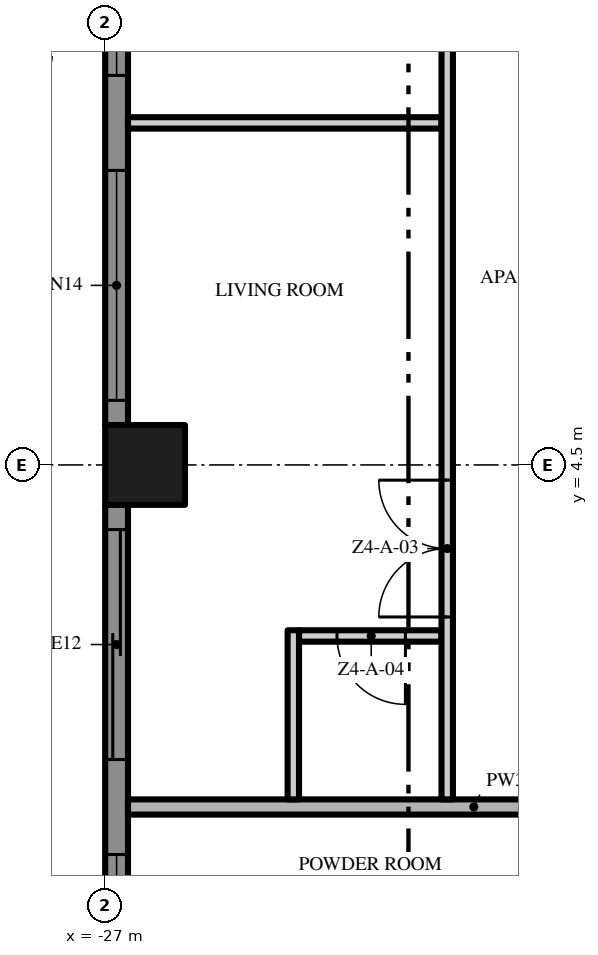
"""IFC4 building model, lengths in metres.
Left out: names, types, materials, properties, quantities, classifications, styles, units other than length and angle.
Written with IfcOpenShell. Run it as: python <this file> out.ifc"""

import sys

from ifc_helpers import new_model, si_unit, direction, frame, frame_2d, origin, origin_2d, place, context, subcontext, project, spatial, polyline, rectangle, outline, extrude, element, fill, save


model = new_model("IFC4")
c1 = context("Model", 3, precision=1e-05, world=origin(), true_north=direction((0.0, 1.0)))
c2 = subcontext(c1, "Body", "Model", "MODEL_VIEW")
j1 = project(units=[si_unit("LENGTHUNIT", "METRE"), si_unit("PLANEANGLEUNIT", "RADIAN")], contexts=[c1])
p1 = place(None, origin())
s1 = spatial("IfcSite", under=j1, at=p1, CompositionType="ELEMENT")
p2 = place(p1, origin())
s2 = spatial("IfcBuilding", under=s1, at=p2, CompositionType="ELEMENT")
p3 = place(p2, frame((0.0, 0.0, 188.2)))
s3 = spatial("IfcBuildingStorey", under=s2, at=p3, CompositionType="ELEMENT", Elevation=188.2)
p4 = place(p3, frame((-26.475, 4.5, 0.0), z_axis=(0.0, 0.0, 1.0), x_axis=(1.0, 0.0, 0.0)))
e1 = element("IfcColumn", 1, at=p4, inside=s3, PredefinedType="COLUMN", context=c2, shape_type="SweptSolid", body=[
    extrude(rectangle(XDim=1.05, YDim=1.05, at=origin_2d()), origin(), (0.0, 0.0, 1.0), 3.5),
])
p5 = place(p3, frame((-26.85, 5.025, 0.0), z_axis=(0.0, 0.0, 1.0), x_axis=(0.0, 1.0, 0.0)))
e2 = element("IfcWall", 2, at=p5, inside=s3, PredefinedType="SOLIDWALL", context=c2, shape_type="SweptSolid", body=[
    extrude(rectangle(XDim=7.95, YDim=0.3, at=frame_2d((3.975, 0.0))), origin(), (0.0, 0.0, 1.0), 3.5),
])
p6 = place(p5, frame((4.6, 0.0, 0.45)))
e3 = element("IfcOpeningElement", 3, at=p6, cuts=e2, PredefinedType="OPENING", context=c2, shape_type="SweptSolid", body=[
    extrude(rectangle(XDim=3.025, YDim=2.65, at=frame_2d((1.512, 1.325))), frame((0.0, 0.16, 0.0), z_axis=(0.0, -1.0, 0.0), x_axis=(1.0, 0.0, 0.0)), (0.0, 0.0, 1.0), 0.32),
])
p7 = place(p5, frame((0.325, 0.0, 0.45)))
e4 = element("IfcOpeningElement", 4, at=p7, cuts=e2, PredefinedType="OPENING", context=c2, shape_type="SweptSolid", body=[
    extrude(rectangle(XDim=3.025, YDim=2.65, at=frame_2d((1.512, 1.325))), frame((0.0, 0.16, 0.0), z_axis=(0.0, -1.0, 0.0), x_axis=(1.0, 0.0, 0.0)), (0.0, 0.0, 1.0), 0.32),
])
p8 = place(p3, frame((-26.85, -3.975, 0.0), z_axis=(0.0, 0.0, 1.0), x_axis=(0.0, 1.0, 0.0)))
e5 = element("IfcWall", 5, at=p8, inside=s3, PredefinedType="SOLIDWALL", context=c2, shape_type="SweptSolid", body=[
    extrude(rectangle(XDim=7.95, YDim=0.3, at=frame_2d((3.975, 0.0))), origin(), (0.0, 0.0, 1.0), 3.5),
])
p9 = place(p8, frame((4.6, 0.0, 0.0)))
e6 = element("IfcOpeningElement", 6, at=p9, cuts=e5, PredefinedType="OPENING", context=c2, shape_type="SweptSolid", body=[
    extrude(rectangle(XDim=3.025, YDim=2.4, at=frame_2d((1.512, 1.2))), frame((0.0, 0.16, 0.0), z_axis=(0.0, -1.0, 0.0), x_axis=(1.0, 0.0, 0.0)), (0.0, 0.0, 1.0), 0.32),
])
p10 = place(p8, frame((0.325, 0.0, 0.45)))
e7 = element("IfcOpeningElement", 7, at=p10, cuts=e5, PredefinedType="OPENING", context=c2, shape_type="SweptSolid", body=[
    extrude(rectangle(XDim=3.025, YDim=2.65, at=frame_2d((1.512, 1.325))), frame((0.0, 0.16, 0.0), z_axis=(0.0, -1.0, 0.0), x_axis=(1.0, 0.0, 0.0)), (0.0, 0.0, 1.0), 0.32),
])
p11 = place(p3, origin())
e8 = element("IfcWall", 8, at=p11, inside=s3, PredefinedType="USERDEFINED", context=c2, shape_type="SweptSolid", body=[
    extrude(outline(polyline([(-30.0, 18.0), (-29.771, 16.5), (-29.171, 15.0), (-28.429, 13.5), (-27.829, 12.0), (-27.6, 10.5), (-27.829, 9.0), (-28.429, 7.5), (-29.171, 6.0), (-29.771, 4.5), (-30.0, 3.0), (-29.771, 1.5), (-29.171, 0.0), (-28.429, -1.5), (-27.829, -3.0), (-27.6, -4.5), (-27.829, -6.0), (-28.429, -7.5), (-29.171, -9.0), (-29.771, -10.5), (-30.0, -12.0), (-29.771, -13.5), (-29.171, -15.0), (-28.429, -16.5), (-27.829, -18.0), (-27.597, -17.907), (-28.201, -16.398), (-28.942, -14.898), (-29.528, -13.434), (-29.747, -12.0), (-29.528, -10.566), (-28.942, -9.102), (-28.201, -7.602), (-27.586, -6.066), (-27.347, -4.5), (-27.586, -2.934), (-28.201, -1.398), (-28.942, 0.102), (-29.528, 1.566), (-29.747, 3.0), (-29.528, 4.434), (-28.942, 5.898), (-28.201, 7.398), (-27.586, 8.934), (-27.347, 10.5), (-27.586, 12.066), (-28.201, 13.602), (-28.942, 15.102), (-29.528, 16.566), (-29.753, 18.038), (-30.0, 18.0)])), origin(), (0.0, 0.0, 1.0), 0.9),
])
p12 = place(p3, frame((-26.7, 0.0, 0.0), z_axis=(0.0, 0.0, 1.0), x_axis=(1.0, 0.0, 0.0)))
e9 = element("IfcWall", 9, at=p12, inside=s3, PredefinedType="PARTITIONING", context=c2, shape_type="SweptSolid", body=[
    extrude(rectangle(XDim=9.1, YDim=0.2, at=frame_2d((4.55, 0.0))), origin(), (0.0, 0.0, 1.0), 3.5),
])
p13 = place(p3, frame((-22.575, 2.25, 0.0), z_axis=(0.0, 0.0, 1.0), x_axis=(-1.0, 0.0, 0.0)))
e10 = element("IfcWall", 10, at=p13, inside=s3, PredefinedType="PARTITIONING", context=c2, shape_type="SweptSolid", body=[
    extrude(rectangle(XDim=1.875, YDim=0.15, at=frame_2d((0.938, 0.0))), origin(), (0.0, 0.0, 1.0), 3.5),
])
p14 = place(p13, frame((0.475, 0.0, 0.0)))
e11 = element("IfcOpeningElement", 11, at=p14, cuts=e10, PredefinedType="OPENING", context=c2, shape_type="SweptSolid", body=[
    extrude(rectangle(XDim=0.9, YDim=2.1, at=frame_2d((0.45, 1.05))), frame((0.0, 0.085, 0.0), z_axis=(0.0, -1.0, 0.0), x_axis=(1.0, 0.0, 0.0)), (0.0, 0.0, 1.0), 0.17),
])
p15 = place(p3, frame((-26.7, 9.0, 0.0), z_axis=(0.0, 0.0, 1.0), x_axis=(1.0, 0.0, 0.0)))
e12 = element("IfcWall", 12, at=p15, inside=s3, PredefinedType="PARTITIONING", context=c2, shape_type="SweptSolid", body=[
    extrude(rectangle(XDim=4.125, YDim=0.15, at=frame_2d((2.062, 0.0))), origin(), (0.0, 0.0, 1.0), 3.5),
])
p16 = place(p3, frame((-24.525, 0.1, 0.0), z_axis=(0.0, 0.0, 1.0), x_axis=(0.0, 1.0, 0.0)))
e13 = element("IfcWall", 13, at=p16, inside=s3, PredefinedType="PARTITIONING", context=c2, shape_type="SweptSolid", body=[
    extrude(rectangle(XDim=2.225, YDim=0.15, at=frame_2d((1.113, 0.0))), origin(), (0.0, 0.0, 1.0), 3.5),
])
p17 = place(p3, frame((-22.5, 0.1, 0.0), z_axis=(0.0, 0.0, 1.0), x_axis=(0.0, 1.0, 0.0)))
e14 = element("IfcWall", 14, at=p17, inside=s3, PredefinedType="PARTITIONING", context=c2, shape_type="SweptSolid", body=[
    extrude(rectangle(XDim=17.375, YDim=0.15, at=frame_2d((8.688, 0.0))), origin(), (0.0, 0.0, 1.0), 3.5),
])
p18 = place(p17, frame((2.4, 0.0, 0.0)))
e15 = element("IfcOpeningElement", 15, at=p18, cuts=e14, PredefinedType="OPENING", context=c2, shape_type="SweptSolid", body=[
    extrude(rectangle(XDim=1.8, YDim=2.4, at=frame_2d((0.9, 1.2))), frame((0.0, 0.085, 0.0), z_axis=(0.0, -1.0, 0.0), x_axis=(1.0, 0.0, 0.0)), (0.0, 0.0, 1.0), 0.17),
])
p19 = place(p17, frame((10.65, 0.0, 0.0)))
e16 = element("IfcOpeningElement", 16, at=p19, cuts=e14, PredefinedType="OPENING", context=c2, shape_type="SweptSolid", body=[
    extrude(rectangle(XDim=1.0, YDim=2.4, at=frame_2d((0.5, 1.2))), frame((0.0, 0.085, 0.0), z_axis=(0.0, -1.0, 0.0), x_axis=(1.0, 0.0, 0.0)), (0.0, 0.0, 1.0), 0.17),
])
p20 = place(p6, origin())
e17 = element("IfcWindow", 17, at=p20, inside=s3, PartitioningType="SINGLE_PANEL", PredefinedType="WINDOW", context=c2, shape_type="SweptSolid", body=[
    extrude(rectangle(XDim=3.025, YDim=2.65, at=frame_2d((1.512, 1.325))), frame((0.0, 0.03, 0.0), z_axis=(0.0, -1.0, 0.0), x_axis=(1.0, 0.0, 0.0)), (0.0, 0.0, 1.0), 0.06),
])
fill(e3, e17)
p21 = place(p7, origin())
e18 = element("IfcWindow", 18, at=p21, inside=s3, PartitioningType="SINGLE_PANEL", PredefinedType="WINDOW", context=c2, shape_type="SweptSolid", body=[
    extrude(rectangle(XDim=3.025, YDim=2.65, at=frame_2d((1.512, 1.325))), frame((0.0, 0.03, 0.0), z_axis=(0.0, -1.0, 0.0), x_axis=(1.0, 0.0, 0.0)), (0.0, 0.0, 1.0), 0.06),
])
fill(e4, e18)
p22 = place(p9, origin())
e19 = element("IfcDoor", 19, at=p22, inside=s3, OperationType="SINGLE_SWING_LEFT", PredefinedType="DOOR", context=c2, shape_type="SweptSolid", body=[
    extrude(rectangle(XDim=3.025, YDim=2.4, at=frame_2d((1.512, 1.2))), frame((0.0, 0.025, 0.0), z_axis=(0.0, -1.0, 0.0), x_axis=(1.0, 0.0, 0.0)), (0.0, 0.0, 1.0), 0.05),
])
fill(e6, e19)
p23 = place(p10, origin())
e20 = element("IfcWindow", 20, at=p23, inside=s3, PartitioningType="SINGLE_PANEL", PredefinedType="WINDOW", context=c2, shape_type="SweptSolid", body=[
    extrude(rectangle(XDim=3.025, YDim=2.65, at=frame_2d((1.512, 1.325))), frame((0.0, 0.03, 0.0), z_axis=(0.0, -1.0, 0.0), x_axis=(1.0, 0.0, 0.0)), (0.0, 0.0, 1.0), 0.06),
])
fill(e7, e20)
p24 = place(p18, origin())
e21 = element("IfcDoor", 21, at=p24, inside=s3, OperationType="DOUBLE_DOOR_SINGLE_SWING", PredefinedType="DOOR", context=c2, shape_type="SweptSolid", body=[
    extrude(rectangle(XDim=1.8, YDim=2.4, at=frame_2d((0.9, 1.2))), frame((0.0, 0.025, 0.0), z_axis=(0.0, -1.0, 0.0), x_axis=(1.0, 0.0, 0.0)), (0.0, 0.0, 1.0), 0.05),
])
fill(e15, e21)
p25 = place(p14, origin())
e22 = element("IfcDoor", 22, at=p25, inside=s3, OperationType="SINGLE_SWING_LEFT", PredefinedType="DOOR", context=c2, shape_type="SweptSolid", body=[
    extrude(rectangle(XDim=0.9, YDim=2.1, at=frame_2d((0.45, 1.05))), frame((0.0, 0.025, 0.0), z_axis=(0.0, -1.0, 0.0), x_axis=(1.0, 0.0, 0.0)), (0.0, 0.0, 1.0), 0.05),
])
fill(e11, e22)
save(model, sys.argv[1])
